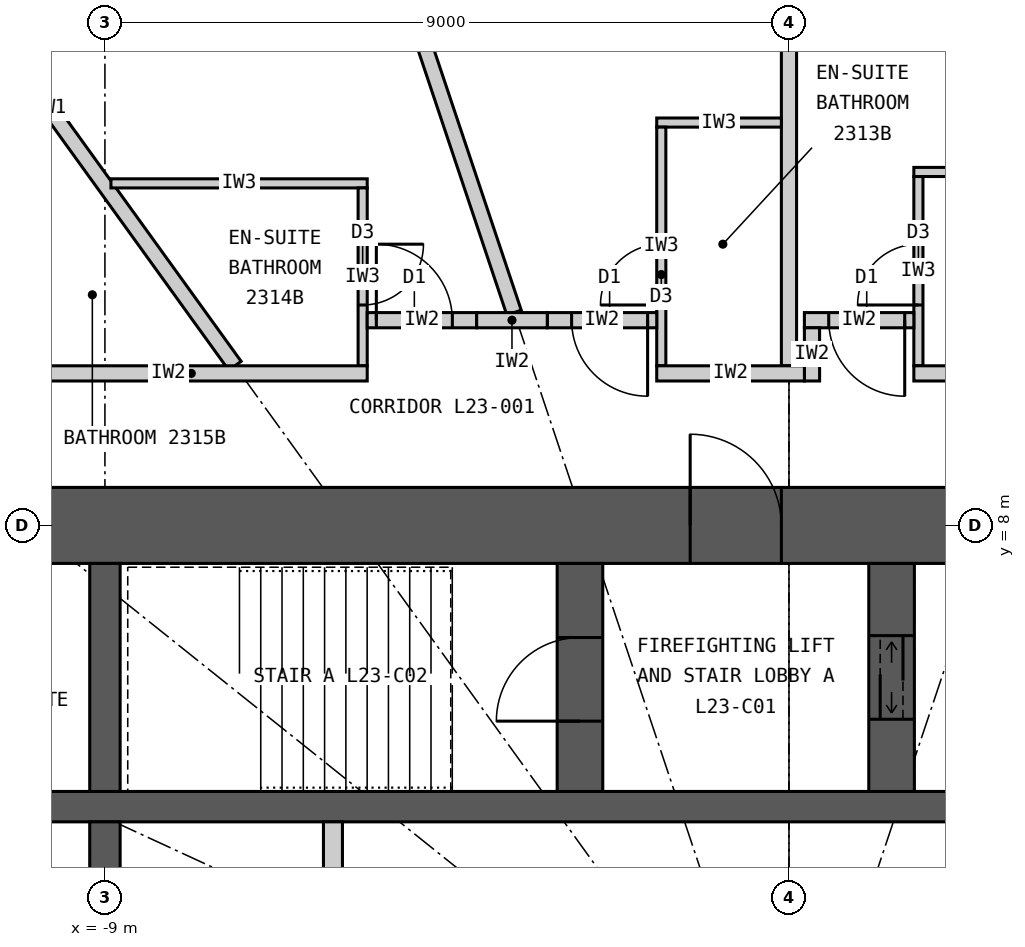
"""IFC4 building model, lengths in metres.
Left out: names, types, materials, properties, quantities, classifications, styles, units other than length and angle.
Written with IfcOpenShell. Run it as: python <this file> out.ifc"""

import sys

from ifc_helpers import new_model, si_unit, direction, frame, frame_2d, origin, place, context, subcontext, project, spatial, rectangle, extrude, element, fill, save


model = new_model("IFC4")
c1 = context("Model", 3, precision=1e-05, world=origin(), true_north=direction((0.0, 1.0)))
c2 = subcontext(c1, "Body", "Model", "MODEL_VIEW")
j1 = project(units=[si_unit("LENGTHUNIT", "METRE"), si_unit("PLANEANGLEUNIT", "RADIAN")], contexts=[c1])
p1 = place(None, origin())
s1 = spatial("IfcSite", under=j1, at=p1, CompositionType="ELEMENT")
p2 = place(p1, origin())
s2 = spatial("IfcBuilding", under=s1, at=p2, CompositionType="ELEMENT")
p3 = place(p2, frame((0.0, 0.0, 90.3)))
s3 = spatial("IfcBuildingStorey", under=s2, at=p3, CompositionType="ELEMENT", Elevation=90.3)
p4 = place(p3, frame((-12.5, 8.0, 0.0), z_axis=(0.0, 0.0, 1.0), x_axis=(1.0, 0.0, 0.0)))
e1 = element("IfcWall", 1, at=p4, inside=s3, PredefinedType="SHEAR", context=c2, shape_type="SweptSolid", body=[
    extrude(rectangle(XDim=25.0, YDim=1.0, at=frame_2d((12.5, 0.0))), origin(), (0.0, 0.0, 1.0), 3.3),
])
p5 = place(p4, frame((11.2, 0.0, 0.0)))
e2 = element("IfcOpeningElement", 2, at=p5, cuts=e1, PredefinedType="OPENING", context=c2, shape_type="SweptSolid", body=[
    extrude(rectangle(XDim=1.2, YDim=2.2, at=frame_2d((0.6, 1.1))), frame((0.0, 0.51, 0.0), z_axis=(0.0, -1.0, 0.0), x_axis=(1.0, 0.0, 0.0)), (0.0, 0.0, 1.0), 1.02),
])
p6 = place(p4, frame((18.8, 0.0, 0.0)))
e3 = element("IfcOpeningElement", 3, at=p6, cuts=e1, PredefinedType="OPENING", context=c2, shape_type="SweptSolid", body=[
    extrude(rectangle(XDim=0.9, YDim=2.2, at=frame_2d((0.45, 1.1))), frame((0.0, 0.51, 0.0), z_axis=(0.0, -1.0, 0.0), x_axis=(1.0, 0.0, 0.0)), (0.0, 0.0, 1.0), 1.02),
])
p7 = place(p3, frame((-11.5, 4.3, 0.0), z_axis=(0.0, 0.0, 1.0), x_axis=(1.0, 0.0, 0.0)))
e4 = element("IfcWall", 4, at=p7, inside=s3, PredefinedType="SHEAR", context=c2, shape_type="SweptSolid", body=[
    extrude(rectangle(XDim=23.0, YDim=0.4, at=frame_2d((11.5, 0.0))), origin(), (0.0, 0.0, 1.0), 3.3),
])
p8 = place(p3, frame((-9.0, 4.5, 0.0), z_axis=(0.0, 0.0, 1.0), x_axis=(0.0, 1.0, 0.0)))
e5 = element("IfcWall", 5, at=p8, inside=s3, PredefinedType="SHEAR", context=c2, shape_type="SweptSolid", body=[
    extrude(rectangle(XDim=3.0, YDim=0.4, at=frame_2d((1.5, 0.0))), origin(), (0.0, 0.0, 1.0), 3.3),
])
p9 = place(p3, frame((-9.0, 1.75, 0.0), z_axis=(0.0, 0.0, 1.0), x_axis=(0.0, 1.0, 0.0)))
e6 = element("IfcWall", 6, at=p9, inside=s3, PredefinedType="SHEAR", context=c2, shape_type="SweptSolid", body=[
    extrude(rectangle(XDim=2.35, YDim=0.4, at=frame_2d((1.175, 0.0))), origin(), (0.0, 0.0, 1.0), 3.3),
])
p10 = place(p3, frame((-2.75, 4.5, 0.0), z_axis=(0.0, 0.0, 1.0), x_axis=(0.0, 1.0, 0.0)))
e7 = element("IfcWall", 7, at=p10, inside=s3, PredefinedType="SHEAR", context=c2, shape_type="SweptSolid", body=[
    extrude(rectangle(XDim=3.0, YDim=0.6, at=frame_2d((1.5, 0.0))), origin(), (0.0, 0.0, 1.0), 3.3),
])
p11 = place(p10, frame((0.925, 0.0, 0.0)))
e8 = element("IfcOpeningElement", 8, at=p11, cuts=e7, PredefinedType="OPENING", context=c2, shape_type="SweptSolid", body=[
    extrude(rectangle(XDim=1.1, YDim=2.2, at=frame_2d((0.55, 1.1))), frame((0.0, 0.31, 0.0), z_axis=(0.0, -1.0, 0.0), x_axis=(1.0, 0.0, 0.0)), (0.0, 0.0, 1.0), 0.62),
])
p12 = place(p3, frame((1.35, 4.5, 0.0), z_axis=(0.0, 0.0, 1.0), x_axis=(0.0, 1.0, 0.0)))
e9 = element("IfcWall", 9, at=p12, inside=s3, PredefinedType="SHEAR", context=c2, shape_type="SweptSolid", body=[
    extrude(rectangle(XDim=3.0, YDim=0.6, at=frame_2d((1.5, 0.0))), origin(), (0.0, 0.0, 1.0), 3.3),
])
p13 = place(p12, frame((0.95, 0.0, 0.0)))
e10 = element("IfcOpeningElement", 10, at=p13, cuts=e9, PredefinedType="OPENING", context=c2, shape_type="SweptSolid", body=[
    extrude(rectangle(XDim=1.1, YDim=2.2, at=frame_2d((0.55, 1.1))), frame((0.0, 0.31, 0.0), z_axis=(0.0, -1.0, 0.0), x_axis=(1.0, 0.0, 0.0)), (0.0, 0.0, 1.0), 0.62),
])
p14 = place(p3, frame((-6.0, 1.75, 0.0), z_axis=(0.0, 0.0, 1.0), x_axis=(0.0, 1.0, 0.0)))
e11 = element("IfcWall", 11, at=p14, inside=s3, PredefinedType="PARTITIONING", context=c2, shape_type="SweptSolid", body=[
    extrude(rectangle(XDim=2.35, YDim=0.25, at=frame_2d((1.175, 0.0))), origin(), (0.0, 0.0, 1.0), 3.3),
])
p15 = place(p3, frame((0.0, 10.1, 0.0), z_axis=(0.0, 0.0, 1.0), x_axis=(0.0, 1.0, 0.0)))
e12 = element("IfcWall", 12, at=p15, inside=s3, PredefinedType="PARTITIONING", context=c2, shape_type="SweptSolid", body=[
    extrude(rectangle(XDim=9.25, YDim=0.2, at=frame_2d((4.625, 0.0))), origin(), (0.0, 0.0, 1.0), 2.25),
])
p16 = place(p3, frame((-3.617, 10.8, 0.0), z_axis=(0.0, 0.0, 1.0), x_axis=(-0.317576599239, 0.948232621046, 0.0)))
e13 = element("IfcWall", 13, at=p16, inside=s3, PredefinedType="PARTITIONING", context=c2, shape_type="SweptSolid", body=[
    extrude(rectangle(XDim=8.36, YDim=0.2, at=frame_2d((4.18, 0.0))), origin(), (0.0, 0.0, 1.0), 2.15),
])
p17 = place(p3, frame((-7.289, 10.1, 0.0), z_axis=(0.0, 0.0, 1.0), x_axis=(-0.585198353053, 0.810890182197, 0.0)))
e14 = element("IfcWall", 14, at=p17, inside=s3, PredefinedType="PARTITIONING", context=c2, shape_type="SweptSolid", body=[
    extrude(rectangle(XDim=8.36, YDim=0.2, at=frame_2d((4.18, 0.0))), origin(), (0.0, 0.0, 1.0), 2.15),
])
p18 = place(p3, frame((4.137, 12.65, 0.0), z_axis=(0.0, 0.0, 1.0), x_axis=(-1.0, 0.0, 0.0)))
e15 = element("IfcWall", 15, at=p18, inside=s3, PredefinedType="PARTITIONING", context=c2, shape_type="SweptSolid", body=[
    extrude(rectangle(XDim=2.494, YDim=0.12, at=frame_2d((1.247, 0.0))), origin(), (0.0, 0.0, 1.0), 3.05),
])
p19 = place(p3, frame((1.703, 10.1, 0.0), z_axis=(0.0, 0.0, 1.0), x_axis=(0.0, 1.0, 0.0)))
e16 = element("IfcWall", 16, at=p19, inside=s3, PredefinedType="PARTITIONING", context=c2, shape_type="SweptSolid", body=[
    extrude(rectangle(XDim=2.49, YDim=0.12, at=frame_2d((1.245, 0.0))), origin(), (0.0, 0.0, 1.0), 3.05),
])
p20 = place(p19, frame((0.8, 0.0, 0.0)))
e17 = element("IfcOpeningElement", 17, at=p20, cuts=e16, PredefinedType="OPENING", context=c2, shape_type="SweptSolid", body=[
    extrude(rectangle(XDim=0.8, YDim=2.1, at=frame_2d((0.4, 1.05))), frame((0.0, 0.07, 0.0), z_axis=(0.0, -1.0, 0.0), x_axis=(1.0, 0.0, 0.0)), (0.0, 0.0, 1.0), 0.14),
])
p21 = place(p3, frame((-0.1, 13.3, 0.0), z_axis=(0.0, 0.0, 1.0), x_axis=(-1.0, 0.0, 0.0)))
e18 = element("IfcWall", 18, at=p21, inside=s3, PredefinedType="PARTITIONING", context=c2, shape_type="SweptSolid", body=[
    extrude(rectangle(XDim=1.64, YDim=0.12, at=frame_2d((0.82, 0.0))), origin(), (0.0, 0.0, 1.0), 3.05),
])
p22 = place(p3, frame((-1.68, 10.1, 0.0), z_axis=(0.0, 0.0, 1.0), x_axis=(0.0, 1.0, 0.0)))
e19 = element("IfcWall", 19, at=p22, inside=s3, PredefinedType="PARTITIONING", context=c2, shape_type="SweptSolid", body=[
    extrude(rectangle(XDim=3.14, YDim=0.12, at=frame_2d((1.57, 0.0))), origin(), (0.0, 0.0, 1.0), 3.05),
])
p23 = place(p22, frame((0.8, 0.0, 0.0)))
e20 = element("IfcOpeningElement", 20, at=p23, cuts=e19, PredefinedType="OPENING", context=c2, shape_type="SweptSolid", body=[
    extrude(rectangle(XDim=0.8, YDim=2.1, at=frame_2d((0.4, 1.05))), frame((0.0, 0.07, 0.0), z_axis=(0.0, -1.0, 0.0), x_axis=(1.0, 0.0, 0.0)), (0.0, 0.0, 1.0), 0.14),
])
p24 = place(p3, frame((-8.921, 12.5, 0.0), z_axis=(0.0, 0.0, 1.0), x_axis=(1.0, 0.0, 0.0)))
e21 = element("IfcWall", 21, at=p24, inside=s3, PredefinedType="PARTITIONING", context=c2, shape_type="SweptSolid", body=[
    extrude(rectangle(XDim=3.372, YDim=0.12, at=frame_2d((1.686, 0.0))), origin(), (0.0, 0.0, 1.0), 3.05),
])
p25 = place(p3, frame((-5.609, 10.1, 0.0), z_axis=(0.0, 0.0, 1.0), x_axis=(0.0, 1.0, 0.0)))
e22 = element("IfcWall", 22, at=p25, inside=s3, PredefinedType="PARTITIONING", context=c2, shape_type="SweptSolid", body=[
    extrude(rectangle(XDim=2.34, YDim=0.12, at=frame_2d((1.17, 0.0))), origin(), (0.0, 0.0, 1.0), 3.05),
])
p26 = place(p25, frame((0.8, 0.0, 0.0)))
e23 = element("IfcOpeningElement", 23, at=p26, cuts=e22, PredefinedType="OPENING", context=c2, shape_type="SweptSolid", body=[
    extrude(rectangle(XDim=0.8, YDim=2.1, at=frame_2d((0.4, 1.05))), frame((0.0, 0.07, 0.0), z_axis=(0.0, -1.0, 0.0), x_axis=(1.0, 0.0, 0.0)), (0.0, 0.0, 1.0), 0.14),
])
p27 = place(p3, frame((0.203, 10.7, 0.0), z_axis=(0.0, 0.0, 1.0), x_axis=(1.0, 0.0, 0.0)))
e24 = element("IfcWall", 24, at=p27, inside=s3, PredefinedType="PARTITIONING", context=c2, shape_type="SweptSolid", body=[
    extrude(rectangle(XDim=1.44, YDim=0.2, at=frame_2d((0.72, 0.0))), origin(), (0.0, 0.0, 1.0), 3.05),
])
p28 = place(p27, frame((0.32, 0.0, 0.0)))
e25 = element("IfcOpeningElement", 25, at=p28, cuts=e24, PredefinedType="OPENING", context=c2, shape_type="SweptSolid", body=[
    extrude(rectangle(XDim=1.0, YDim=2.2, at=frame_2d((0.5, 1.1))), frame((0.0, 0.11, 0.0), z_axis=(0.0, -1.0, 0.0), x_axis=(1.0, 0.0, 0.0)), (0.0, 0.0, 1.0), 0.22),
])
p29 = place(p3, frame((0.303, 9.9, 0.0), z_axis=(0.0, 0.0, 1.0), x_axis=(0.0, 1.0, 0.0)))
e26 = element("IfcWall", 26, at=p29, inside=s3, PredefinedType="PARTITIONING", context=c2, shape_type="SweptSolid", body=[
    extrude(rectangle(XDim=0.7, YDim=0.2, at=frame_2d((0.35, 0.0))), origin(), (0.0, 0.0, 1.0), 3.05),
])
p30 = place(p3, frame((-3.18, 10.7, 0.0), z_axis=(0.0, 0.0, 1.0), x_axis=(1.0, 0.0, 0.0)))
e27 = element("IfcWall", 27, at=p30, inside=s3, PredefinedType="PARTITIONING", context=c2, shape_type="SweptSolid", body=[
    extrude(rectangle(XDim=1.44, YDim=0.2, at=frame_2d((0.72, 0.0))), origin(), (0.0, 0.0, 1.0), 3.05),
])
p31 = place(p30, frame((0.32, 0.0, 0.0)))
e28 = element("IfcOpeningElement", 28, at=p31, cuts=e27, PredefinedType="OPENING", context=c2, shape_type="SweptSolid", body=[
    extrude(rectangle(XDim=1.0, YDim=2.2, at=frame_2d((0.5, 1.1))), frame((0.0, 0.11, 0.0), z_axis=(0.0, -1.0, 0.0), x_axis=(1.0, 0.0, 0.0)), (0.0, 0.0, 1.0), 0.22),
])
p32 = place(p3, frame((-5.549, 10.7, 0.0), z_axis=(0.0, 0.0, 1.0), x_axis=(1.0, 0.0, 0.0)))
e29 = element("IfcWall", 29, at=p32, inside=s3, PredefinedType="PARTITIONING", context=c2, shape_type="SweptSolid", body=[
    extrude(rectangle(XDim=1.44, YDim=0.2, at=frame_2d((0.72, 0.0))), origin(), (0.0, 0.0, 1.0), 3.05),
])
p33 = place(p32, frame((0.12, 0.0, 0.0)))
e30 = element("IfcOpeningElement", 30, at=p33, cuts=e29, PredefinedType="OPENING", context=c2, shape_type="SweptSolid", body=[
    extrude(rectangle(XDim=1.0, YDim=2.2, at=frame_2d((0.5, 1.1))), frame((0.0, 0.11, 0.0), z_axis=(0.0, -1.0, 0.0), x_axis=(1.0, 0.0, 0.0)), (0.0, 0.0, 1.0), 0.22),
])
p34 = place(p3, frame((-4.109, 10.7, 0.0), z_axis=(0.0, 0.0, 1.0), x_axis=(1.0, 0.0, 0.0)))
e31 = element("IfcWall", 31, at=p34, inside=s3, PredefinedType="PARTITIONING", context=c2, shape_type="SweptSolid", body=[
    extrude(rectangle(XDim=0.929, YDim=0.2, at=frame_2d((0.465, 0.0))), origin(), (0.0, 0.0, 1.0), 3.05),
])
p35 = place(p3, frame((-10.179, 10.0, 0.0), z_axis=(0.0, 0.0, 1.0), x_axis=(1.0, 0.0, 0.0)))
e32 = element("IfcWall", 32, at=p35, inside=s3, PredefinedType="PARTITIONING", context=c2, shape_type="SweptSolid", body=[
    extrude(rectangle(XDim=4.63, YDim=0.2, at=frame_2d((2.315, 0.0))), origin(), (0.0, 0.0, 1.0), 3.05),
])
p36 = place(p3, frame((-1.74, 10.0, 0.0), z_axis=(0.0, 0.0, 1.0), x_axis=(1.0, 0.0, 0.0)))
e33 = element("IfcWall", 33, at=p36, inside=s3, PredefinedType="PARTITIONING", context=c2, shape_type="SweptSolid", body=[
    extrude(rectangle(XDim=1.943, YDim=0.2, at=frame_2d((0.971, 0.0))), origin(), (0.0, 0.0, 1.0), 3.05),
])
p37 = place(p3, frame((1.643, 10.0, 0.0), z_axis=(0.0, 0.0, 1.0), x_axis=(1.0, 0.0, 0.0)))
e34 = element("IfcWall", 34, at=p37, inside=s3, PredefinedType="PARTITIONING", context=c2, shape_type="SweptSolid", body=[
    extrude(rectangle(XDim=2.466, YDim=0.2, at=frame_2d((1.233, 0.0))), origin(), (0.0, 0.0, 1.0), 3.05),
])
p38 = place(p20, origin())
e35 = element("IfcDoor", 35, at=p38, inside=s3, OperationType="SINGLE_SWING_LEFT", PredefinedType="DOOR", context=c2, shape_type="SweptSolid", body=[
    extrude(rectangle(XDim=0.8, YDim=2.1, at=frame_2d((0.4, 1.05))), frame((0.0, 0.025, 0.0), z_axis=(0.0, -1.0, 0.0), x_axis=(1.0, 0.0, 0.0)), (0.0, 0.0, 1.0), 0.05),
])
fill(e17, e35)
p39 = place(p28, origin())
e36 = element("IfcDoor", 36, at=p39, inside=s3, OperationType="SINGLE_SWING_RIGHT", PredefinedType="DOOR", context=c2, shape_type="SweptSolid", body=[
    extrude(rectangle(XDim=1.0, YDim=2.2, at=frame_2d((0.5, 1.1))), frame((0.0, 0.025, 0.0), z_axis=(0.0, -1.0, 0.0), x_axis=(1.0, 0.0, 0.0)), (0.0, 0.0, 1.0), 0.05),
])
fill(e25, e36)
p40 = place(p23, origin())
e37 = element("IfcDoor", 37, at=p40, inside=s3, OperationType="SINGLE_SWING_LEFT", PredefinedType="DOOR", context=c2, shape_type="SweptSolid", body=[
    extrude(rectangle(XDim=0.8, YDim=2.1, at=frame_2d((0.4, 1.05))), frame((0.0, 0.025, 0.0), z_axis=(0.0, -1.0, 0.0), x_axis=(1.0, 0.0, 0.0)), (0.0, 0.0, 1.0), 0.05),
])
fill(e20, e37)
p41 = place(p31, origin())
e38 = element("IfcDoor", 38, at=p41, inside=s3, OperationType="SINGLE_SWING_RIGHT", PredefinedType="DOOR", context=c2, shape_type="SweptSolid", body=[
    extrude(rectangle(XDim=1.0, YDim=2.2, at=frame_2d((0.5, 1.1))), frame((0.0, 0.025, 0.0), z_axis=(0.0, -1.0, 0.0), x_axis=(1.0, 0.0, 0.0)), (0.0, 0.0, 1.0), 0.05),
])
fill(e28, e38)
p42 = place(p26, origin())
e39 = element("IfcDoor", 39, at=p42, inside=s3, OperationType="SINGLE_SWING_RIGHT", PredefinedType="DOOR", context=c2, shape_type="SweptSolid", body=[
    extrude(rectangle(XDim=0.8, YDim=2.1, at=frame_2d((0.4, 1.05))), frame((0.0, 0.025, 0.0), z_axis=(0.0, -1.0, 0.0), x_axis=(1.0, 0.0, 0.0)), (0.0, 0.0, 1.0), 0.05),
])
fill(e23, e39)
p43 = place(p33, origin())
e40 = element("IfcDoor", 40, at=p43, inside=s3, OperationType="SINGLE_SWING_LEFT", PredefinedType="DOOR", context=c2, shape_type="SweptSolid", body=[
    extrude(rectangle(XDim=1.0, YDim=2.2, at=frame_2d((0.5, 1.1))), frame((0.0, 0.025, 0.0), z_axis=(0.0, -1.0, 0.0), x_axis=(1.0, 0.0, 0.0)), (0.0, 0.0, 1.0), 0.05),
])
fill(e30, e40)
p44 = place(p5, origin())
e41 = element("IfcDoor", 41, at=p44, inside=s3, OperationType="SINGLE_SWING_LEFT", PredefinedType="DOOR", context=c2, shape_type="SweptSolid", body=[
    extrude(rectangle(XDim=1.2, YDim=2.2, at=frame_2d((0.6, 1.1))), frame((0.0, 0.025, 0.0), z_axis=(0.0, -1.0, 0.0), x_axis=(1.0, 0.0, 0.0)), (0.0, 0.0, 1.0), 0.05),
])
fill(e2, e41)
p45 = place(p11, origin())
e42 = element("IfcDoor", 42, at=p45, inside=s3, OperationType="SINGLE_SWING_LEFT", PredefinedType="DOOR", context=c2, shape_type="SweptSolid", body=[
    extrude(rectangle(XDim=1.1, YDim=2.2, at=frame_2d((0.55, 1.1))), frame((0.0, 0.025, 0.0), z_axis=(0.0, -1.0, 0.0), x_axis=(1.0, 0.0, 0.0)), (0.0, 0.0, 1.0), 0.05),
])
fill(e8, e42)
p46 = place(p13, origin())
e43 = element("IfcDoor", 43, at=p46, inside=s3, OperationType="DOUBLE_DOOR_SLIDING", PredefinedType="DOOR", context=c2, shape_type="SweptSolid", body=[
    extrude(rectangle(XDim=1.1, YDim=2.2, at=frame_2d((0.55, 1.1))), frame((0.0, 0.025, 0.0), z_axis=(0.0, -1.0, 0.0), x_axis=(1.0, 0.0, 0.0)), (0.0, 0.0, 1.0), 0.05),
])
fill(e10, e43)
save(model, sys.argv[1])
